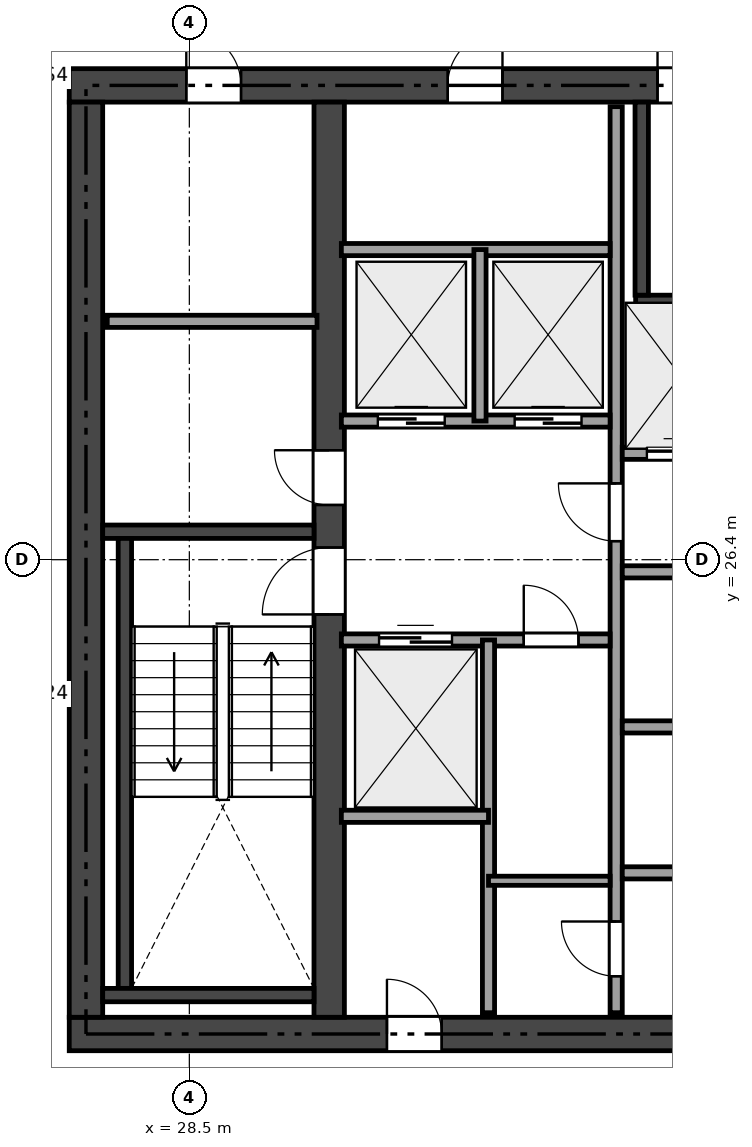
"""IFC4 building model, lengths in metres.
Left out: names, types, materials, properties, quantities, classifications, styles, units other than length and angle.
Written with IfcOpenShell. Run it as: python <this file> out.ifc"""

import sys

from ifc_helpers import new_model, si_unit, direction, frame, frame_2d, origin, place, context, subcontext, project, spatial, rectangle, extrude, element, fill, save


model = new_model("IFC4")
c1 = context("Model", 3, precision=1e-05, world=origin(), true_north=direction((0.0, 1.0)))
c2 = subcontext(c1, "Body", "Model", "MODEL_VIEW")
j1 = project(units=[si_unit("LENGTHUNIT", "METRE"), si_unit("PLANEANGLEUNIT", "RADIAN")], contexts=[c1])
p1 = place(None, origin())
s1 = spatial("IfcSite", under=j1, at=p1, CompositionType="ELEMENT")
p2 = place(p1, origin())
s2 = spatial("IfcBuilding", under=s1, at=p2, CompositionType="ELEMENT")
p3 = place(p2, frame((0.0, 0.0, 271.5)))
s3 = spatial("IfcBuildingStorey", under=s2, at=p3, CompositionType="ELEMENT", Elevation=271.5)
p4 = place(p3, frame((26.525, 18.6, 0.0), z_axis=(0.0, 0.0, 1.0), x_axis=(1.0, 0.0, 0.0)))
e1 = element("IfcWall", 1, at=p4, inside=s3, PredefinedType="SHEAR", context=c2, shape_type="SweptSolid", body=[
    extrude(rectangle(XDim=21.35, YDim=0.55, at=frame_2d((10.675, 0.0))), origin(), (0.0, 0.0, 1.0), 3.32),
])
p5 = place(p4, frame((12.4, 0.0, 0.0)))
e2 = element("IfcOpeningElement", 2, at=p5, cuts=e1, PredefinedType="OPENING", context=c2, shape_type="SweptSolid", body=[
    extrude(rectangle(XDim=1.15, YDim=2.15, at=frame_2d((0.575, 1.075))), frame((0.0, 0.285, 0.0), z_axis=(0.0, -1.0, 0.0), x_axis=(1.0, 0.0, 0.0)), (0.0, 0.0, 1.0), 0.57),
])
p6 = place(p4, frame((5.225, 0.0, 0.0)))
e3 = element("IfcOpeningElement", 3, at=p6, cuts=e1, PredefinedType="OPENING", context=c2, shape_type="SweptSolid", body=[
    extrude(rectangle(XDim=0.9, YDim=2.1, at=frame_2d((0.45, 1.05))), frame((0.0, 0.285, 0.0), z_axis=(0.0, -1.0, 0.0), x_axis=(1.0, 0.0, 0.0)), (0.0, 0.0, 1.0), 0.57),
])
p7 = place(p3, frame((26.525, 34.2, 0.0), z_axis=(0.0, 0.0, 1.0), x_axis=(1.0, 0.0, 0.0)))
e4 = element("IfcWall", 4, at=p7, inside=s3, PredefinedType="SHEAR", context=c2, shape_type="SweptSolid", body=[
    extrude(rectangle(XDim=21.35, YDim=0.55, at=frame_2d((10.675, 0.0))), origin(), (0.0, 0.0, 1.0), 3.32),
])
p8 = place(p7, frame((9.675, 0.0, 0.0)))
e5 = element("IfcOpeningElement", 5, at=p8, cuts=e4, PredefinedType="OPENING", context=c2, shape_type="SweptSolid", body=[
    extrude(rectangle(XDim=1.1, YDim=2.15, at=frame_2d((0.55, 1.075))), frame((0.0, 0.285, 0.0), z_axis=(0.0, -1.0, 0.0), x_axis=(1.0, 0.0, 0.0)), (0.0, 0.0, 1.0), 0.57),
])
p9 = place(p7, frame((1.925, 0.0, 0.0)))
e6 = element("IfcOpeningElement", 6, at=p9, cuts=e4, PredefinedType="OPENING", context=c2, shape_type="SweptSolid", body=[
    extrude(rectangle(XDim=0.9, YDim=2.1, at=frame_2d((0.45, 1.05))), frame((0.0, 0.285, 0.0), z_axis=(0.0, -1.0, 0.0), x_axis=(1.0, 0.0, 0.0)), (0.0, 0.0, 1.0), 0.57),
])
p10 = place(p7, frame((6.225, 0.0, 0.0)))
e7 = element("IfcOpeningElement", 7, at=p10, cuts=e4, PredefinedType="OPENING", context=c2, shape_type="SweptSolid", body=[
    extrude(rectangle(XDim=0.9, YDim=2.1, at=frame_2d((0.45, 1.05))), frame((0.0, 0.285, 0.0), z_axis=(0.0, -1.0, 0.0), x_axis=(1.0, 0.0, 0.0)), (0.0, 0.0, 1.0), 0.57),
])
p11 = place(p3, frame((26.8, 18.875, 0.0), z_axis=(0.0, 0.0, 1.0), x_axis=(0.0, 1.0, 0.0)))
e8 = element("IfcWall", 8, at=p11, inside=s3, PredefinedType="SHEAR", context=c2, shape_type="SweptSolid", body=[
    extrude(rectangle(XDim=15.05, YDim=0.55, at=frame_2d((7.525, 0.0))), origin(), (0.0, 0.0, 1.0), 3.32),
])
p12 = place(p3, frame((30.8, 18.875, 0.0), z_axis=(0.0, 0.0, 1.0), x_axis=(0.0, 1.0, 0.0)))
e9 = element("IfcWall", 9, at=p12, inside=s3, PredefinedType="SHEAR", context=c2, shape_type="SweptSolid", body=[
    extrude(rectangle(XDim=15.05, YDim=0.5, at=frame_2d((7.525, 0.0))), origin(), (0.0, 0.0, 1.0), 3.32),
])
p13 = place(p12, frame((6.625, 0.0, 0.0)))
e10 = element("IfcOpeningElement", 10, at=p13, cuts=e9, PredefinedType="OPENING", context=c2, shape_type="SweptSolid", body=[
    extrude(rectangle(XDim=1.1, YDim=2.15, at=frame_2d((0.55, 1.075))), frame((0.0, 0.26, 0.0), z_axis=(0.0, -1.0, 0.0), x_axis=(1.0, 0.0, 0.0)), (0.0, 0.0, 1.0), 0.52),
])
p14 = place(p12, frame((8.425, 0.0, 0.0)))
e11 = element("IfcOpeningElement", 11, at=p14, cuts=e9, PredefinedType="OPENING", context=c2, shape_type="SweptSolid", body=[
    extrude(rectangle(XDim=0.9, YDim=2.1, at=frame_2d((0.45, 1.05))), frame((0.0, 0.26, 0.0), z_axis=(0.0, -1.0, 0.0), x_axis=(1.0, 0.0, 0.0)), (0.0, 0.0, 1.0), 0.52),
])
p15 = place(p3, frame((27.075, 26.86, 0.0), z_axis=(0.0, 0.0, 1.0), x_axis=(1.0, 0.0, 0.0)))
e12 = element("IfcWall", 12, at=p15, inside=s3, PredefinedType="SHEAR", context=c2, shape_type="SweptSolid", body=[
    extrude(rectangle(XDim=3.475, YDim=0.22, at=frame_2d((1.738, 0.0))), origin(), (0.0, 0.0, 1.0), 3.32),
])
p16 = place(p3, frame((27.44, 19.35, 0.0), z_axis=(0.0, 0.0, 1.0), x_axis=(0.0, 1.0, 0.0)))
e13 = element("IfcWall", 13, at=p16, inside=s3, PredefinedType="SHEAR", context=c2, shape_type="SweptSolid", body=[
    extrude(rectangle(XDim=7.4, YDim=0.22, at=frame_2d((3.7, 0.0))), origin(), (0.0, 0.0, 1.0), 3.32),
])
p17 = place(p3, frame((27.075, 19.24, 0.0), z_axis=(0.0, 0.0, 1.0), x_axis=(1.0, 0.0, 0.0)))
e14 = element("IfcWall", 14, at=p17, inside=s3, PredefinedType="SHEAR", context=c2, shape_type="SweptSolid", body=[
    extrude(rectangle(XDim=3.475, YDim=0.22, at=frame_2d((1.738, 0.0))), origin(), (0.0, 0.0, 1.0), 3.32),
])
p18 = place(p3, frame((35.84, 30.64, 0.0), z_axis=(0.0, 0.0, 1.0), x_axis=(1.0, 0.0, 0.0)))
e15 = element("IfcWall", 15, at=p18, inside=s3, PredefinedType="SHEAR", context=c2, shape_type="SweptSolid", body=[
    extrude(rectangle(XDim=7.61, YDim=0.22, at=frame_2d((3.805, 0.0))), origin(), (0.0, 0.0, 1.0), 3.32),
])
p19 = place(p3, frame((35.94, 30.75, 0.0), z_axis=(0.0, 0.0, 1.0), x_axis=(0.0, 1.0, 0.0)))
e16 = element("IfcWall", 16, at=p19, inside=s3, PredefinedType="SHEAR", context=c2, shape_type="SweptSolid", body=[
    extrude(rectangle(XDim=3.175, YDim=0.22, at=frame_2d((1.587, 0.0))), origin(), (0.0, 0.0, 1.0), 3.32),
])
p20 = place(p3, frame((27.15, 30.32, 0.0), z_axis=(0.0, 0.0, 1.0), x_axis=(1.0, 0.0, 0.0)))
e17 = element("IfcWall", 17, at=p20, inside=s3, PredefinedType="SOLIDWALL", context=c2, shape_type="SweptSolid", body=[
    extrude(rectangle(XDim=3.45, YDim=0.2, at=frame_2d((1.725, 0.0))), origin(), (0.0, 0.0, 1.0), 2.993),
])
p21 = place(p3, frame((35.52, 18.95, 0.0), z_axis=(0.0, 0.0, 1.0), x_axis=(0.0, 1.0, 0.0)))
e18 = element("IfcWall", 18, at=p21, inside=s3, PredefinedType="SOLIDWALL", context=c2, shape_type="SweptSolid", body=[
    extrude(rectangle(XDim=14.9, YDim=0.2, at=frame_2d((7.45, 0.0))), origin(), (0.0, 0.0, 1.0), 2.841),
])
p22 = place(p21, frame((7.755, 0.0, 0.0)))
e19 = element("IfcOpeningElement", 19, at=p22, cuts=e18, PredefinedType="OPENING", context=c2, shape_type="SweptSolid", body=[
    extrude(rectangle(XDim=0.95, YDim=2.15, at=frame_2d((0.475, 1.075))), frame((0.0, 0.11, 0.0), z_axis=(0.0, -1.0, 0.0), x_axis=(1.0, 0.0, 0.0)), (0.0, 0.0, 1.0), 0.22),
])
p23 = place(p21, frame((0.6, 0.0, 0.0)))
e20 = element("IfcOpeningElement", 20, at=p23, cuts=e18, PredefinedType="OPENING", context=c2, shape_type="SweptSolid", body=[
    extrude(rectangle(XDim=0.9, YDim=2.1, at=frame_2d((0.45, 1.05))), frame((0.0, 0.11, 0.0), z_axis=(0.0, -1.0, 0.0), x_axis=(1.0, 0.0, 0.0)), (0.0, 0.0, 1.0), 0.22),
])
p24 = place(p3, frame((31.0, 28.68, 0.0), z_axis=(0.0, 0.0, 1.0), x_axis=(1.0, 0.0, 0.0)))
e21 = element("IfcWall", 21, at=p24, inside=s3, PredefinedType="SOLIDWALL", context=c2, shape_type="SweptSolid", body=[
    extrude(rectangle(XDim=4.42, YDim=0.2, at=frame_2d((2.21, 0.0))), origin(), (0.0, 0.0, 1.0), 3.32),
])
p25 = place(p24, frame((0.6, 0.0, 0.0)))
e22 = element("IfcOpeningElement", 22, at=p25, cuts=e21, PredefinedType="OPENING", context=c2, shape_type="SweptSolid", body=[
    extrude(rectangle(XDim=1.1, YDim=2.15, at=frame_2d((0.55, 1.075))), frame((0.0, 0.11, 0.0), z_axis=(0.0, -1.0, 0.0), x_axis=(1.0, 0.0, 0.0)), (0.0, 0.0, 1.0), 0.22),
])
p26 = place(p24, frame((2.85, 0.0, 0.0)))
e23 = element("IfcOpeningElement", 23, at=p26, cuts=e21, PredefinedType="OPENING", context=c2, shape_type="SweptSolid", body=[
    extrude(rectangle(XDim=1.1, YDim=2.15, at=frame_2d((0.55, 1.075))), frame((0.0, 0.11, 0.0), z_axis=(0.0, -1.0, 0.0), x_axis=(1.0, 0.0, 0.0)), (0.0, 0.0, 1.0), 0.22),
])
p27 = place(p3, frame((31.0, 31.5, 0.0), z_axis=(0.0, 0.0, 1.0), x_axis=(1.0, 0.0, 0.0)))
e24 = element("IfcWall", 24, at=p27, inside=s3, PredefinedType="SOLIDWALL", context=c2, shape_type="SweptSolid", body=[
    extrude(rectangle(XDim=4.42, YDim=0.2, at=frame_2d((2.21, 0.0))), origin(), (0.0, 0.0, 1.0), 3.32),
])
p28 = place(p3, frame((33.28, 28.68, 0.0), z_axis=(0.0, 0.0, 1.0), x_axis=(0.0, 1.0, 0.0)))
e25 = element("IfcWall", 25, at=p28, inside=s3, PredefinedType="SOLIDWALL", context=c2, shape_type="SweptSolid", body=[
    extrude(rectangle(XDim=2.82, YDim=0.2, at=frame_2d((1.41, 0.0))), origin(), (0.0, 0.0, 1.0), 3.32),
])
p29 = place(p3, frame((31.0, 25.08, 0.0), z_axis=(0.0, 0.0, 1.0), x_axis=(1.0, 0.0, 0.0)))
e26 = element("IfcWall", 26, at=p29, inside=s3, PredefinedType="SOLIDWALL", context=c2, shape_type="SweptSolid", body=[
    extrude(rectangle(XDim=4.42, YDim=0.2, at=frame_2d((2.21, 0.0))), origin(), (0.0, 0.0, 1.0), 3.32),
])
p30 = place(p29, frame((3.0, 0.0, 0.0)))
e27 = element("IfcOpeningElement", 27, at=p30, cuts=e26, PredefinedType="OPENING", context=c2, shape_type="SweptSolid", body=[
    extrude(rectangle(XDim=0.9, YDim=2.1, at=frame_2d((0.45, 1.05))), frame((0.0, 0.11, 0.0), z_axis=(0.0, -1.0, 0.0), x_axis=(1.0, 0.0, 0.0)), (0.0, 0.0, 1.0), 0.22),
])
p31 = place(p29, frame((0.62, 0.0, 0.0)))
e28 = element("IfcOpeningElement", 28, at=p31, cuts=e26, PredefinedType="OPENING", context=c2, shape_type="SweptSolid", body=[
    extrude(rectangle(XDim=1.2, YDim=2.15, at=frame_2d((0.6, 1.075))), frame((0.0, 0.11, 0.0), z_axis=(0.0, -1.0, 0.0), x_axis=(1.0, 0.0, 0.0)), (0.0, 0.0, 1.0), 0.22),
])
p32 = place(p3, frame((33.42, 18.95, 0.0), z_axis=(0.0, 0.0, 1.0), x_axis=(0.0, 1.0, 0.0)))
e29 = element("IfcWall", 29, at=p32, inside=s3, PredefinedType="SOLIDWALL", context=c2, shape_type="SweptSolid", body=[
    extrude(rectangle(XDim=6.13, YDim=0.2, at=frame_2d((3.065, 0.0))), origin(), (0.0, 0.0, 1.0), 2.841),
])
p33 = place(p3, frame((31.0, 22.18, 0.0), z_axis=(0.0, 0.0, 1.0), x_axis=(1.0, 0.0, 0.0)))
e30 = element("IfcWall", 30, at=p33, inside=s3, PredefinedType="SOLIDWALL", context=c2, shape_type="SweptSolid", body=[
    extrude(rectangle(XDim=2.42, YDim=0.2, at=frame_2d((1.21, 0.0))), origin(), (0.0, 0.0, 1.0), 3.32),
])
p34 = place(p3, frame((33.42, 21.12, 0.0), z_axis=(0.0, 0.0, 1.0), x_axis=(1.0, 0.0, 0.0)))
e31 = element("IfcWall", 31, at=p34, inside=s3, PredefinedType="PARTITIONING", context=c2, shape_type="SweptSolid", body=[
    extrude(rectangle(XDim=2.0, YDim=0.15, at=frame_2d((1.0, 0.0))), origin(), (0.0, 0.0, 1.0), 3.32),
])
p35 = place(p3, frame((35.62, 28.15, 0.0), z_axis=(0.0, 0.0, 1.0), x_axis=(1.0, 0.0, 0.0)))
e32 = element("IfcWall", 32, at=p35, inside=s3, PredefinedType="SOLIDWALL", context=c2, shape_type="SweptSolid", body=[
    extrude(rectangle(XDim=7.88, YDim=0.2, at=frame_2d((3.94, 0.0))), origin(), (0.0, 0.0, 1.0), 3.32),
])
p36 = place(p35, frame((0.405, 0.0, 0.0)))
e33 = element("IfcOpeningElement", 33, at=p36, cuts=e32, PredefinedType="OPENING", context=c2, shape_type="SweptSolid", body=[
    extrude(rectangle(XDim=1.1, YDim=2.15, at=frame_2d((0.55, 1.075))), frame((0.0, 0.11, 0.0), z_axis=(0.0, -1.0, 0.0), x_axis=(1.0, 0.0, 0.0)), (0.0, 0.0, 1.0), 0.22),
])
p37 = place(p35, frame((2.355, 0.0, 0.0)))
e34 = element("IfcOpeningElement", 34, at=p37, cuts=e32, PredefinedType="OPENING", context=c2, shape_type="SweptSolid", body=[
    extrude(rectangle(XDim=1.1, YDim=2.15, at=frame_2d((0.55, 1.075))), frame((0.0, 0.11, 0.0), z_axis=(0.0, -1.0, 0.0), x_axis=(1.0, 0.0, 0.0)), (0.0, 0.0, 1.0), 0.22),
])
p38 = place(p35, frame((4.305, 0.0, 0.0)))
e35 = element("IfcOpeningElement", 35, at=p38, cuts=e32, PredefinedType="OPENING", context=c2, shape_type="SweptSolid", body=[
    extrude(rectangle(XDim=1.1, YDim=2.15, at=frame_2d((0.55, 1.075))), frame((0.0, 0.11, 0.0), z_axis=(0.0, -1.0, 0.0), x_axis=(1.0, 0.0, 0.0)), (0.0, 0.0, 1.0), 0.22),
])
p39 = place(p35, frame((6.255, 0.0, 0.0)))
e36 = element("IfcOpeningElement", 36, at=p39, cuts=e32, PredefinedType="OPENING", context=c2, shape_type="SweptSolid", body=[
    extrude(rectangle(XDim=1.1, YDim=2.15, at=frame_2d((0.55, 1.075))), frame((0.0, 0.11, 0.0), z_axis=(0.0, -1.0, 0.0), x_axis=(1.0, 0.0, 0.0)), (0.0, 0.0, 1.0), 0.22),
])
p40 = place(p3, frame((35.62, 26.2, 0.0), z_axis=(0.0, 0.0, 1.0), x_axis=(1.0, 0.0, 0.0)))
e37 = element("IfcWall", 37, at=p40, inside=s3, PredefinedType="SOLIDWALL", context=c2, shape_type="SweptSolid", body=[
    extrude(rectangle(XDim=7.88, YDim=0.2, at=frame_2d((3.94, 0.0))), origin(), (0.0, 0.0, 1.0), 3.32),
])
p41 = place(p40, frame((1.13, 0.0, 0.0)))
e38 = element("IfcOpeningElement", 38, at=p41, cuts=e37, PredefinedType="OPENING", context=c2, shape_type="SweptSolid", body=[
    extrude(rectangle(XDim=0.9, YDim=2.1, at=frame_2d((0.45, 1.05))), frame((0.0, 0.11, 0.0), z_axis=(0.0, -1.0, 0.0), x_axis=(1.0, 0.0, 0.0)), (0.0, 0.0, 1.0), 0.22),
])
p42 = place(p40, frame((5.73, 0.0, 0.0)))
e39 = element("IfcOpeningElement", 39, at=p42, cuts=e37, PredefinedType="OPENING", context=c2, shape_type="SweptSolid", body=[
    extrude(rectangle(XDim=0.9, YDim=2.1, at=frame_2d((0.45, 1.05))), frame((0.0, 0.11, 0.0), z_axis=(0.0, -1.0, 0.0), x_axis=(1.0, 0.0, 0.0)), (0.0, 0.0, 1.0), 0.22),
])
p43 = place(p3, frame((35.62, 23.65, 0.0), z_axis=(0.0, 0.0, 1.0), x_axis=(1.0, 0.0, 0.0)))
e40 = element("IfcWall", 40, at=p43, inside=s3, PredefinedType="SOLIDWALL", context=c2, shape_type="SweptSolid", body=[
    extrude(rectangle(XDim=7.88, YDim=0.2, at=frame_2d((3.94, 0.0))), origin(), (0.0, 0.0, 1.0), 2.841),
])
p44 = place(p3, frame((35.62, 21.25, 0.0), z_axis=(0.0, 0.0, 1.0), x_axis=(1.0, 0.0, 0.0)))
e41 = element("IfcWall", 41, at=p44, inside=s3, PredefinedType="SOLIDWALL", context=c2, shape_type="SweptSolid", body=[
    extrude(rectangle(XDim=7.88, YDim=0.2, at=frame_2d((3.94, 0.0))), origin(), (0.0, 0.0, 1.0), 3.32),
])
p45 = place(p44, frame((1.13, 0.0, 0.0)))
e42 = element("IfcOpeningElement", 42, at=p45, cuts=e41, PredefinedType="OPENING", context=c2, shape_type="SweptSolid", body=[
    extrude(rectangle(XDim=0.9, YDim=2.1, at=frame_2d((0.45, 1.05))), frame((0.0, 0.11, 0.0), z_axis=(0.0, -1.0, 0.0), x_axis=(1.0, 0.0, 0.0)), (0.0, 0.0, 1.0), 0.22),
])
p46 = place(p44, frame((5.73, 0.0, 0.0)))
e43 = element("IfcOpeningElement", 43, at=p46, cuts=e41, PredefinedType="OPENING", context=c2, shape_type="SweptSolid", body=[
    extrude(rectangle(XDim=0.9, YDim=2.1, at=frame_2d((0.45, 1.05))), frame((0.0, 0.11, 0.0), z_axis=(0.0, -1.0, 0.0), x_axis=(1.0, 0.0, 0.0)), (0.0, 0.0, 1.0), 0.22),
])
p47 = place(p13, origin())
e44 = element("IfcDoor", 44, at=p47, inside=s3, OperationType="SINGLE_SWING_LEFT", PredefinedType="DOOR", context=c2, shape_type="SweptSolid", body=[
    extrude(rectangle(XDim=1.1, YDim=2.15, at=frame_2d((0.55, 1.075))), frame((0.0, 0.025, 0.0), z_axis=(0.0, -1.0, 0.0), x_axis=(1.0, 0.0, 0.0)), (0.0, 0.0, 1.0), 0.05),
])
fill(e10, e44)
p48 = place(p8, origin())
e45 = element("IfcDoor", 45, at=p48, inside=s3, OperationType="SINGLE_SWING_LEFT", PredefinedType="DOOR", context=c2, shape_type="SweptSolid", body=[
    extrude(rectangle(XDim=1.1, YDim=2.15, at=frame_2d((0.55, 1.075))), frame((0.0, 0.025, 0.0), z_axis=(0.0, -1.0, 0.0), x_axis=(1.0, 0.0, 0.0)), (0.0, 0.0, 1.0), 0.05),
])
fill(e5, e45)
p49 = place(p22, origin())
e46 = element("IfcDoor", 46, at=p49, inside=s3, OperationType="SINGLE_SWING_RIGHT", PredefinedType="DOOR", context=c2, shape_type="SweptSolid", body=[
    extrude(rectangle(XDim=0.95, YDim=2.15, at=frame_2d((0.475, 1.075))), frame((0.0, 0.025, 0.0), z_axis=(0.0, -1.0, 0.0), x_axis=(1.0, 0.0, 0.0)), (0.0, 0.0, 1.0), 0.05),
])
fill(e19, e46)
p50 = place(p14, origin())
e47 = element("IfcDoor", 47, at=p50, inside=s3, OperationType="SINGLE_SWING_RIGHT", PredefinedType="DOOR", context=c2, shape_type="SweptSolid", body=[
    extrude(rectangle(XDim=0.9, YDim=2.1, at=frame_2d((0.45, 1.05))), frame((0.0, 0.025, 0.0), z_axis=(0.0, -1.0, 0.0), x_axis=(1.0, 0.0, 0.0)), (0.0, 0.0, 1.0), 0.05),
])
fill(e11, e47)
p51 = place(p9, origin())
e48 = element("IfcDoor", 48, at=p51, inside=s3, OperationType="SINGLE_SWING_LEFT", PredefinedType="DOOR", context=c2, shape_type="SweptSolid", body=[
    extrude(rectangle(XDim=0.9, YDim=2.1, at=frame_2d((0.45, 1.05))), frame((0.0, 0.025, 0.0), z_axis=(0.0, -1.0, 0.0), x_axis=(1.0, 0.0, 0.0)), (0.0, 0.0, 1.0), 0.05),
])
fill(e6, e48)
p52 = place(p10, origin())
e49 = element("IfcDoor", 49, at=p52, inside=s3, OperationType="SINGLE_SWING_RIGHT", PredefinedType="DOOR", context=c2, shape_type="SweptSolid", body=[
    extrude(rectangle(XDim=0.9, YDim=2.1, at=frame_2d((0.45, 1.05))), frame((0.0, 0.025, 0.0), z_axis=(0.0, -1.0, 0.0), x_axis=(1.0, 0.0, 0.0)), (0.0, 0.0, 1.0), 0.05),
])
fill(e7, e49)
p53 = place(p6, origin())
e50 = element("IfcDoor", 50, at=p53, inside=s3, OperationType="SINGLE_SWING_LEFT", PredefinedType="DOOR", context=c2, shape_type="SweptSolid", body=[
    extrude(rectangle(XDim=0.9, YDim=2.1, at=frame_2d((0.45, 1.05))), frame((0.0, 0.025, 0.0), z_axis=(0.0, -1.0, 0.0), x_axis=(1.0, 0.0, 0.0)), (0.0, 0.0, 1.0), 0.05),
])
fill(e3, e50)
p54 = place(p23, origin())
e51 = element("IfcDoor", 51, at=p54, inside=s3, OperationType="SINGLE_SWING_RIGHT", PredefinedType="DOOR", context=c2, shape_type="SweptSolid", body=[
    extrude(rectangle(XDim=0.9, YDim=2.1, at=frame_2d((0.45, 1.05))), frame((0.0, 0.025, 0.0), z_axis=(0.0, -1.0, 0.0), x_axis=(1.0, 0.0, 0.0)), (0.0, 0.0, 1.0), 0.05),
])
fill(e20, e51)
p55 = place(p30, origin())
e52 = element("IfcDoor", 52, at=p55, inside=s3, OperationType="SINGLE_SWING_LEFT", PredefinedType="DOOR", context=c2, shape_type="SweptSolid", body=[
    extrude(rectangle(XDim=0.9, YDim=2.1, at=frame_2d((0.45, 1.05))), frame((0.0, 0.025, 0.0), z_axis=(0.0, -1.0, 0.0), x_axis=(1.0, 0.0, 0.0)), (0.0, 0.0, 1.0), 0.05),
])
fill(e27, e52)
p56 = place(p25, origin())
e53 = element("IfcDoor", 53, at=p56, inside=s3, OperationType="SLIDING_TO_LEFT", PredefinedType="DOOR", context=c2, shape_type="SweptSolid", body=[
    extrude(rectangle(XDim=1.1, YDim=2.15, at=frame_2d((0.55, 1.075))), frame((0.0, 0.025, 0.0), z_axis=(0.0, -1.0, 0.0), x_axis=(1.0, 0.0, 0.0)), (0.0, 0.0, 1.0), 0.05),
])
fill(e22, e53)
p57 = place(p26, origin())
e54 = element("IfcDoor", 54, at=p57, inside=s3, OperationType="SLIDING_TO_LEFT", PredefinedType="DOOR", context=c2, shape_type="SweptSolid", body=[
    extrude(rectangle(XDim=1.1, YDim=2.15, at=frame_2d((0.55, 1.075))), frame((0.0, 0.025, 0.0), z_axis=(0.0, -1.0, 0.0), x_axis=(1.0, 0.0, 0.0)), (0.0, 0.0, 1.0), 0.05),
])
fill(e23, e54)
p58 = place(p31, origin())
e55 = element("IfcDoor", 55, at=p58, inside=s3, OperationType="SLIDING_TO_LEFT", PredefinedType="DOOR", context=c2, shape_type="SweptSolid", body=[
    extrude(rectangle(XDim=1.2, YDim=2.15, at=frame_2d((0.6, 1.075))), frame((0.0, 0.025, 0.0), z_axis=(0.0, -1.0, 0.0), x_axis=(1.0, 0.0, 0.0)), (0.0, 0.0, 1.0), 0.05),
])
fill(e28, e55)
p59 = place(p36, origin())
e56 = element("IfcDoor", 56, at=p59, inside=s3, OperationType="SLIDING_TO_LEFT", PredefinedType="DOOR", context=c2, shape_type="SweptSolid", body=[
    extrude(rectangle(XDim=1.1, YDim=2.15, at=frame_2d((0.55, 1.075))), frame((0.0, 0.025, 0.0), z_axis=(0.0, -1.0, 0.0), x_axis=(1.0, 0.0, 0.0)), (0.0, 0.0, 1.0), 0.05),
])
fill(e33, e56)
save(model, sys.argv[1])
